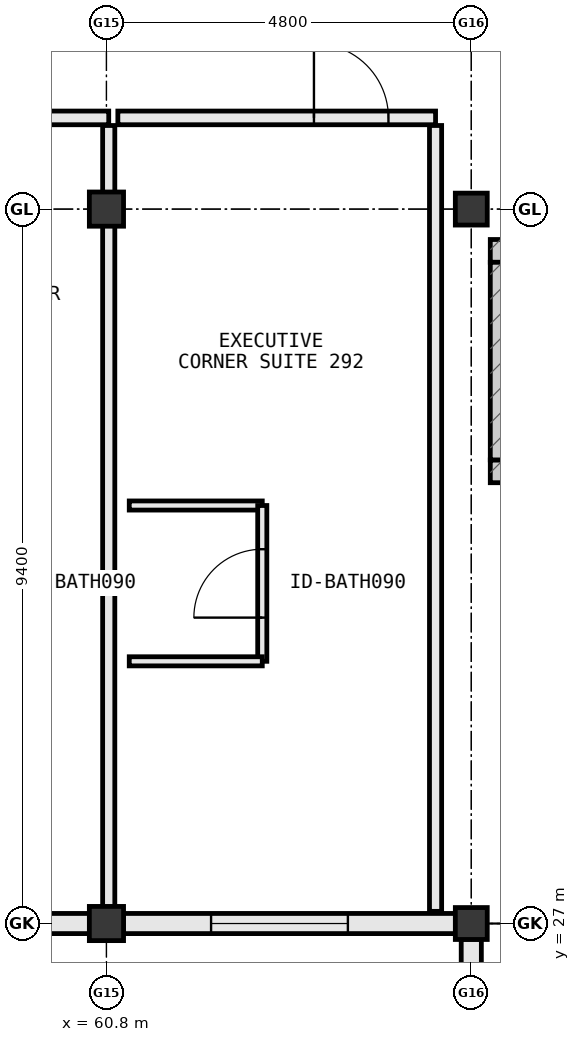
"""IFC4 building model, lengths in metres.
Left out: names, types, materials, properties, quantities, classifications, styles, units other than length and angle.
Written with IfcOpenShell. Run it as: python <this file> out.ifc"""

import sys

from ifc_helpers import new_model, si_unit, direction, frame, frame_2d, origin, origin_2d, place, context, subcontext, project, spatial, rectangle, extrude, element, fill, save


model = new_model("IFC4")
c1 = context("Model", 3, precision=1e-05, world=origin(), true_north=direction((0.0, 1.0)))
c2 = subcontext(c1, "Body", "Model", "MODEL_VIEW")
j1 = project(units=[si_unit("LENGTHUNIT", "METRE"), si_unit("PLANEANGLEUNIT", "RADIAN")], contexts=[c1])
p1 = place(None, origin())
s1 = spatial("IfcSite", under=j1, at=p1, CompositionType="ELEMENT")
p2 = place(p1, origin())
s2 = spatial("IfcBuilding", under=s1, at=p2, CompositionType="ELEMENT")
p3 = place(p2, frame((0.0, 0.0, 42.8)))
s3 = spatial("IfcBuildingStorey", under=s2, at=p3, CompositionType="ELEMENT", Elevation=42.8)
for number, where, z_axis, x_axis in (
    (1, (60.8, 27.0, 0.0), (0.0, 0.0, 1.0), (1.0, 0.0, 0.0)),
    (2, (60.8, 36.4, 0.0), (0.0, 0.0, 1.0), (1.0, 0.0, 0.0)),
):
    element("IfcColumn", number, at=place(p3, frame(where, z_axis=z_axis, x_axis=x_axis)), inside=s3, PredefinedType="COLUMN", context=c2, shape_type="SweptSolid", body=[
        extrude(rectangle(XDim=0.45, YDim=0.45, at=origin_2d()), origin(), (0.0, 0.0, 1.0), 3.8),
    ])
for number, where, z_axis, x_axis in (
    (3, (65.6, 27.0, 0.0), (0.0, 0.0, 1.0), (1.0, 0.0, 0.0)),
    (4, (65.6, 36.4, 0.0), (0.0, 0.0, 1.0), (1.0, 0.0, 0.0)),
):
    element("IfcColumn", number, at=place(p3, frame(where, z_axis=z_axis, x_axis=x_axis)), inside=s3, PredefinedType="COLUMN", context=c2, shape_type="SweptSolid", body=[
        extrude(rectangle(XDim=0.42, YDim=0.42, at=origin_2d()), origin(), (0.0, 0.0, 1.0), 3.8),
    ])
p4 = place(p3, frame((51.423, 27.0, 0.0), z_axis=(0.0, 0.0, 1.0), x_axis=(1.0, 0.0, 0.0)))
e5 = element("IfcWall", 5, at=p4, inside=s3, PredefinedType="STANDARD", context=c2, shape_type="SweptSolid", body=[
    extrude(rectangle(XDim=9.154, YDim=0.265, at=frame_2d((4.577, 0.0))), origin(), (0.0, 0.0, 1.0), 2.815),
])
p5 = place(p4, frame((6.265, 0.0, 0.85)))
e6 = element("IfcOpeningElement", 6, at=p5, cuts=e5, PredefinedType="OPENING", context=c2, shape_type="SweptSolid", body=[
    extrude(rectangle(XDim=1.2, YDim=1.55, at=frame_2d((0.6, 0.775))), frame((0.0, 0.145, 0.0), z_axis=(0.0, -1.0, 0.0), x_axis=(1.0, 0.0, 0.0)), (0.0, 0.0, 1.0), 0.289),
])
p6 = place(p4, frame((0.253, 0.0, 0.825)))
e7 = element("IfcOpeningElement", 7, at=p6, cuts=e5, PredefinedType="OPENING", context=c2, shape_type="SweptSolid", body=[
    extrude(rectangle(XDim=1.8, YDim=1.85, at=frame_2d((0.9, 0.925))), frame((0.0, 0.145, 0.0), z_axis=(0.0, -1.0, 0.0), x_axis=(1.0, 0.0, 0.0)), (0.0, 0.0, 1.0), 0.289),
])
p7 = place(p4, frame((3.242, 0.0, 0.825)))
e8 = element("IfcOpeningElement", 8, at=p7, cuts=e5, PredefinedType="OPENING", context=c2, shape_type="SweptSolid", body=[
    extrude(rectangle(XDim=1.8, YDim=1.85, at=frame_2d((0.9, 0.925))), frame((0.0, 0.145, 0.0), z_axis=(0.0, -1.0, 0.0), x_axis=(1.0, 0.0, 0.0)), (0.0, 0.0, 1.0), 0.289),
])
p8 = place(p3, frame((61.023, 27.0, 0.0), z_axis=(0.0, 0.0, 1.0), x_axis=(1.0, 0.0, 0.0)))
e9 = element("IfcWall", 9, at=p8, inside=s3, PredefinedType="STANDARD", context=c2, shape_type="SweptSolid", body=[
    extrude(rectangle(XDim=4.369, YDim=0.265, at=frame_2d((2.185, 0.0))), origin(), (0.0, 0.0, 1.0), 2.995),
])
p9 = place(p8, frame((1.154, 0.0, 0.85)))
e10 = element("IfcOpeningElement", 10, at=p9, cuts=e9, PredefinedType="OPENING", context=c2, shape_type="SweptSolid", body=[
    extrude(rectangle(XDim=1.8, YDim=1.85, at=frame_2d((0.9, 0.925))), frame((0.0, 0.145, 0.0), z_axis=(0.0, -1.0, 0.0), x_axis=(1.0, 0.0, 0.0)), (0.0, 0.0, 1.0), 0.289),
])
p10 = place(p3, frame((65.6, 26.792, 0.0), z_axis=(0.0, 0.0, 1.0), x_axis=(0.0, -1.0, 0.0)))
e11 = element("IfcWall", 11, at=p10, inside=s3, PredefinedType="STANDARD", context=c2, shape_type="SweptSolid", body=[
    extrude(rectangle(XDim=7.984, YDim=0.265, at=frame_2d((3.992, 0.0))), origin(), (0.0, 0.0, 1.0), 2.995),
])
p11 = place(p10, frame((3.317, 0.0, 0.85)))
e12 = element("IfcOpeningElement", 12, at=p11, cuts=e11, PredefinedType="OPENING", context=c2, shape_type="SweptSolid", body=[
    extrude(rectangle(XDim=1.35, YDim=1.65, at=frame_2d((0.675, 0.825))), frame((0.0, 0.145, 0.0), z_axis=(0.0, -1.0, 0.0), x_axis=(1.0, 0.0, 0.0)), (0.0, 0.0, 1.0), 0.289),
])
p12 = place(p3, frame((65.85, 32.95, 0.0), z_axis=(0.0, 0.0, 1.0), x_axis=(1.0, 0.0, 0.0)))
e13 = element("IfcWall", 13, at=p12, inside=s3, PredefinedType="SHEAR", context=c2, shape_type="SweptSolid", body=[
    extrude(rectangle(XDim=2.9, YDim=0.3, at=frame_2d((1.45, 0.0))), origin(), (0.0, 0.0, 1.0), 3.8),
])
p13 = place(p12, frame((0.85, 0.0, 0.0)))
e14 = element("IfcOpeningElement", 14, at=p13, cuts=e13, PredefinedType="OPENING", context=c2, shape_type="SweptSolid", body=[
    extrude(rectangle(XDim=1.2, YDim=2.2, at=frame_2d((0.6, 1.1))), frame((0.0, 0.162, 0.0), z_axis=(0.0, -1.0, 0.0), x_axis=(1.0, 0.0, 0.0)), (0.0, 0.0, 1.0), 0.324),
])
p14 = place(p3, frame((68.75, 35.85, 0.0), z_axis=(0.0, 0.0, 1.0), x_axis=(-1.0, 0.0, 0.0)))
e15 = element("IfcWall", 15, at=p14, inside=s3, PredefinedType="SHEAR", context=c2, shape_type="SweptSolid", body=[
    extrude(rectangle(XDim=2.9, YDim=0.3, at=frame_2d((1.45, 0.0))), origin(), (0.0, 0.0, 1.0), 3.8),
])
p15 = place(p3, frame((66.0, 35.7, 0.0), z_axis=(0.0, 0.0, 1.0), x_axis=(0.0, -1.0, 0.0)))
e16 = element("IfcWall", 16, at=p15, inside=s3, PredefinedType="SHEAR", context=c2, shape_type="SweptSolid", body=[
    extrude(rectangle(XDim=2.6, YDim=0.3, at=frame_2d((1.3, 0.0))), origin(), (0.0, 0.0, 1.0), 3.8),
])
p16 = place(p3, frame((60.83, 37.6, 0.0), z_axis=(0.0, 0.0, 1.0), x_axis=(-1.0, 0.0, 0.0)))
e17 = element("IfcWall", 17, at=p16, inside=s3, PredefinedType="PARTITIONING", context=c2, shape_type="SweptSolid", body=[
    extrude(rectangle(XDim=3.43, YDim=0.18, at=frame_2d((1.715, 0.0))), origin(), (0.0, 0.0, 1.0), 3.54),
])
p17 = place(p16, frame((1.225, 0.0, 0.0)))
e18 = element("IfcOpeningElement", 18, at=p17, cuts=e17, PredefinedType="OPENING", context=c2, shape_type="SweptSolid", body=[
    extrude(rectangle(XDim=0.98, YDim=2.18, at=frame_2d((0.49, 1.09))), frame((0.0, 0.102, 0.0), z_axis=(0.0, -1.0, 0.0), x_axis=(1.0, 0.0, 0.0)), (0.0, 0.0, 1.0), 0.204),
])
p18 = place(p3, frame((60.83, 27.16, 0.0), z_axis=(0.0, 0.0, 1.0), x_axis=(0.0, 1.0, 0.0)))
e19 = element("IfcWall", 19, at=p18, inside=s3, PredefinedType="PARTITIONING", context=c2, shape_type="SweptSolid", body=[
    extrude(rectangle(XDim=10.34, YDim=0.16, at=frame_2d((5.17, 0.0))), origin(), (0.0, 0.0, 1.0), 2.895),
])
p19 = place(p3, frame((65.13, 37.6, 0.0), z_axis=(0.0, 0.0, 1.0), x_axis=(-1.0, 0.0, 0.0)))
e20 = element("IfcWall", 20, at=p19, inside=s3, PredefinedType="PARTITIONING", context=c2, shape_type="SweptSolid", body=[
    extrude(rectangle(XDim=4.18, YDim=0.18, at=frame_2d((2.09, 0.0))), origin(), (0.0, 0.0, 1.0), 3.54),
])
p20 = place(p19, frame((0.62, 0.0, 0.0)))
e21 = element("IfcOpeningElement", 21, at=p20, cuts=e20, PredefinedType="OPENING", context=c2, shape_type="SweptSolid", body=[
    extrude(rectangle(XDim=0.98, YDim=2.18, at=frame_2d((0.49, 1.09))), frame((0.0, 0.102, 0.0), z_axis=(0.0, -1.0, 0.0), x_axis=(1.0, 0.0, 0.0)), (0.0, 0.0, 1.0), 0.204),
])
p21 = place(p3, frame((65.13, 27.16, 0.0), z_axis=(0.0, 0.0, 1.0), x_axis=(0.0, 1.0, 0.0)))
e22 = element("IfcWall", 22, at=p21, inside=s3, PredefinedType="PARTITIONING", context=c2, shape_type="SweptSolid", body=[
    extrude(rectangle(XDim=10.34, YDim=0.16, at=frame_2d((5.17, 0.0))), origin(), (0.0, 0.0, 1.0), 3.54),
])
p22 = place(p3, frame((61.1, 32.5, 0.0), z_axis=(0.0, 0.0, 1.0), x_axis=(1.0, 0.0, 0.0)))
e23 = element("IfcWall", 23, at=p22, inside=s3, PredefinedType="PARTITIONING", context=c2, shape_type="SweptSolid", body=[
    extrude(rectangle(XDim=1.75, YDim=0.12, at=frame_2d((0.875, 0.0))), origin(), (0.0, 0.0, 1.0), 3.54),
])
p23 = place(p3, frame((62.85, 30.45, 0.0), z_axis=(0.0, 0.0, 1.0), x_axis=(0.0, 1.0, 0.0)))
e24 = element("IfcWall", 24, at=p23, inside=s3, PredefinedType="PARTITIONING", context=c2, shape_type="SweptSolid", body=[
    extrude(rectangle(XDim=2.05, YDim=0.12, at=frame_2d((1.025, 0.0))), origin(), (0.0, 0.0, 1.0), 3.085),
])
p24 = place(p23, frame((0.575, 0.0, 0.0)))
e25 = element("IfcOpeningElement", 25, at=p24, cuts=e24, PredefinedType="OPENING", context=c2, shape_type="SweptSolid", body=[
    extrude(rectangle(XDim=0.9, YDim=2.15, at=frame_2d((0.45, 1.075))), frame((0.0, 0.072, 0.0), z_axis=(0.0, -1.0, 0.0), x_axis=(1.0, 0.0, 0.0)), (0.0, 0.0, 1.0), 0.144),
])
p25 = place(p3, frame((61.1, 30.45, 0.0), z_axis=(0.0, 0.0, 1.0), x_axis=(1.0, 0.0, 0.0)))
e26 = element("IfcWall", 26, at=p25, inside=s3, PredefinedType="PARTITIONING", context=c2, shape_type="SweptSolid", body=[
    extrude(rectangle(XDim=1.75, YDim=0.12, at=frame_2d((0.875, 0.0))), origin(), (0.0, 0.0, 1.0), 3.54),
])
p26 = place(p9, origin())
e27 = element("IfcWindow", 27, at=p26, inside=s3, PartitioningType="SINGLE_PANEL", PredefinedType="WINDOW", context=c2, shape_type="SweptSolid", body=[
    extrude(rectangle(XDim=1.8, YDim=1.85, at=frame_2d((0.9, 0.925))), frame((0.0, 0.03, 0.0), z_axis=(0.0, -1.0, 0.0), x_axis=(1.0, 0.0, 0.0)), (0.0, 0.0, 1.0), 0.06),
])
fill(e10, e27)
p27 = place(p20, frame((0.98, 0.0, 0.0), z_axis=(0.0, 0.0, 1.0), x_axis=(-1.0, 0.0, 0.0)))
e28 = element("IfcDoor", 28, at=p27, inside=s3, OperationType="SINGLE_SWING_RIGHT", PredefinedType="DOOR", context=c2, shape_type="SweptSolid", body=[
    extrude(rectangle(XDim=0.98, YDim=2.18, at=frame_2d((0.49, 1.09))), frame((0.0, 0.025, 0.0), z_axis=(0.0, -1.0, 0.0), x_axis=(1.0, 0.0, 0.0)), (0.0, 0.0, 1.0), 0.05),
])
fill(e21, e28)
p28 = place(p24, origin())
e29 = element("IfcDoor", 29, at=p28, inside=s3, OperationType="SINGLE_SWING_LEFT", PredefinedType="DOOR", context=c2, shape_type="SweptSolid", body=[
    extrude(rectangle(XDim=0.9, YDim=2.15, at=frame_2d((0.45, 1.075))), frame((0.0, 0.025, 0.0), z_axis=(0.0, -1.0, 0.0), x_axis=(1.0, 0.0, 0.0)), (0.0, 0.0, 1.0), 0.05),
])
fill(e25, e29)
save(model, sys.argv[1])
